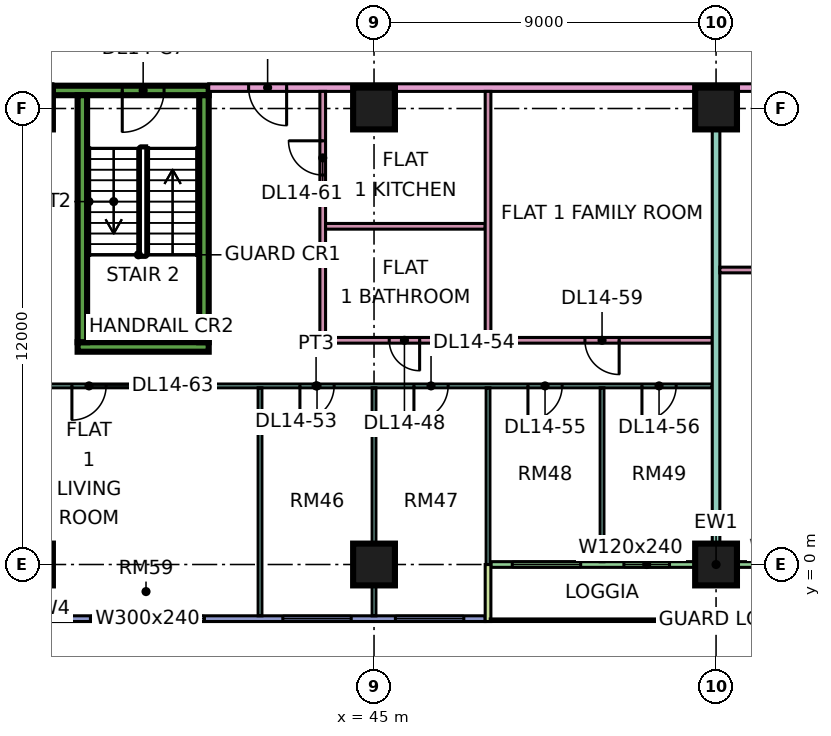
"""IFC4 building model, lengths in metres.
Left out: names, types, materials, properties, quantities, classifications, styles, units other than length and angle.
Written with IfcOpenShell. Run it as: python <this file> out.ifc"""

import sys

from ifc_helpers import new_model, si_unit, direction, frame, frame_2d, origin, origin_2d, place, context, subcontext, project, spatial, rectangle, extrude, element, fill, save


model = new_model("IFC4")
c1 = context("Model", 3, precision=1e-05, world=origin(), true_north=direction((0.0, 1.0)))
c2 = subcontext(c1, "Body", "Model", "MODEL_VIEW")
j1 = project(units=[si_unit("LENGTHUNIT", "METRE"), si_unit("PLANEANGLEUNIT", "RADIAN")], contexts=[c1])
p1 = place(None, origin())
s1 = spatial("IfcSite", under=j1, at=p1, CompositionType="ELEMENT")
p2 = place(p1, origin())
s2 = spatial("IfcBuilding", under=s1, at=p2, CompositionType="ELEMENT")
p3 = place(p2, frame((0.0, 0.0, 67.65)))
s3 = spatial("IfcBuildingStorey", under=s2, at=p3, CompositionType="ELEMENT", Elevation=67.65)
for number, where, z_axis, x_axis in (
    (1, (36.0, 0.0, 0.0), (0.0, 0.0, 1.0), (1.0, 0.0, 0.0)),
    (2, (36.0, 12.0, 0.0), (0.0, 0.0, 1.0), (1.0, 0.0, 0.0)),
    (3, (45.0, 0.0, 0.0), (0.0, 0.0, 1.0), (1.0, 0.0, 0.0)),
    (4, (45.0, 12.0, 0.0), (0.0, 0.0, 1.0), (1.0, 0.0, 0.0)),
    (5, (54.0, 0.0, 0.0), (0.0, 0.0, 1.0), (1.0, 0.0, 0.0)),
    (6, (54.0, 12.0, 0.0), (0.0, 0.0, 1.0), (1.0, 0.0, 0.0)),
):
    element("IfcColumn", number, at=place(p3, frame(where, z_axis=z_axis, x_axis=x_axis)), inside=s3, PredefinedType="COLUMN", context=c2, shape_type="SweptSolid", body=[
        extrude(rectangle(XDim=1.1, YDim=1.1, at=origin_2d()), origin(), (0.0, 0.0, 1.0), 3.75),
    ])
p4 = place(p3, frame((37.2, 5.725, 0.0), z_axis=(0.0, 0.0, 1.0), x_axis=(1.0, 0.0, 0.0)))
e7 = element("IfcWall", 7, at=p4, inside=s3, PredefinedType="SHEAR", context=c2, shape_type="SweptSolid", body=[
    extrude(rectangle(XDim=3.45, YDim=0.25, at=frame_2d((1.725, 0.0))), origin(), (0.0, 0.0, 1.0), 3.75),
])
p5 = place(p3, frame((36.55, 12.475, 0.0), z_axis=(0.0, 0.0, 1.0), x_axis=(1.0, 0.0, 0.0)))
e8 = element("IfcWall", 8, at=p5, inside=s3, PredefinedType="SHEAR", context=c2, shape_type="SweptSolid", body=[
    extrude(rectangle(XDim=4.1, YDim=0.25, at=frame_2d((2.05, 0.0))), origin(), (0.0, 0.0, 1.0), 3.75),
])
p6 = place(p5, frame((1.825, 0.0, 0.0)))
e9 = element("IfcOpeningElement", 9, at=p6, cuts=e8, PredefinedType="OPENING", context=c2, shape_type="SweptSolid", body=[
    extrude(rectangle(XDim=1.1, YDim=2.2, at=frame_2d((0.55, 1.1))), frame((0.0, 0.135, 0.0), z_axis=(0.0, -1.0, 0.0), x_axis=(1.0, 0.0, 0.0)), (0.0, 0.0, 1.0), 0.27),
])
for number, where, z_axis, x_axis in (
    (10, (37.325, 5.85, 0.0), (0.0, 0.0, 1.0), (0.0, 1.0, 0.0)),
    (11, (40.525, 5.85, 0.0), (0.0, 0.0, 1.0), (0.0, 1.0, 0.0)),
):
    element("IfcWall", number, at=place(p3, frame(where, z_axis=z_axis, x_axis=x_axis)), inside=s3, PredefinedType="SHEAR", context=c2, shape_type="SweptSolid", body=[
        extrude(rectangle(XDim=6.5, YDim=0.25, at=frame_2d((3.25, 0.0))), origin(), (0.0, 0.0, 1.0), 3.75),
    ])
p7 = place(p3, frame((36.075, -1.425, 0.0), z_axis=(0.0, 0.0, 1.0), x_axis=(1.0, 0.0, 0.0)))
e12 = element("IfcWall", 12, at=p7, inside=s3, PredefinedType="SOLIDWALL", context=c2, shape_type="SweptSolid", body=[
    extrude(rectangle(XDim=11.85, YDim=0.15, at=frame_2d((5.925, 0.0))), origin(), (0.0, 0.0, 1.0), 3.35),
])
p8 = place(p7, frame((1.462, 0.0, 0.45)))
e13 = element("IfcOpeningElement", 13, at=p8, cuts=e12, PredefinedType="OPENING", context=c2, shape_type="SweptSolid", body=[
    extrude(rectangle(XDim=3.0, YDim=2.4, at=frame_2d((1.5, 1.2))), frame((0.0, 0.085, 0.0), z_axis=(0.0, -1.0, 0.0), x_axis=(1.0, 0.0, 0.0)), (0.0, 0.0, 1.0), 0.17),
])
p9 = place(p7, frame((6.525, 0.0, 0.45)))
e14 = element("IfcOpeningElement", 14, at=p9, cuts=e12, PredefinedType="OPENING", context=c2, shape_type="SweptSolid", body=[
    extrude(rectangle(XDim=1.8, YDim=2.4, at=frame_2d((0.9, 1.2))), frame((0.0, 0.085, 0.0), z_axis=(0.0, -1.0, 0.0), x_axis=(1.0, 0.0, 0.0)), (0.0, 0.0, 1.0), 0.17),
])
p10 = place(p7, frame((9.488, 0.0, 0.45)))
e15 = element("IfcOpeningElement", 15, at=p10, cuts=e12, PredefinedType="OPENING", context=c2, shape_type="SweptSolid", body=[
    extrude(rectangle(XDim=1.8, YDim=2.4, at=frame_2d((0.9, 1.2))), frame((0.0, 0.085, 0.0), z_axis=(0.0, -1.0, 0.0), x_axis=(1.0, 0.0, 0.0)), (0.0, 0.0, 1.0), 0.17),
])
p11 = place(p3, frame((48.075, 0.0, 0.0), z_axis=(0.0, 0.0, 1.0), x_axis=(1.0, 0.0, 0.0)))
e16 = element("IfcWall", 16, at=p11, inside=s3, PredefinedType="SOLIDWALL", context=c2, shape_type="SweptSolid", body=[
    extrude(rectangle(XDim=11.85, YDim=0.15, at=frame_2d((5.925, 0.0))), origin(), (0.0, 0.0, 1.0), 3.35),
])
p12 = place(p11, frame((0.562, 0.0, 0.45)))
e17 = element("IfcOpeningElement", 17, at=p12, cuts=e16, PredefinedType="OPENING", context=c2, shape_type="SweptSolid", body=[
    extrude(rectangle(XDim=1.8, YDim=2.4, at=frame_2d((0.9, 1.2))), frame((0.0, 0.085, 0.0), z_axis=(0.0, -1.0, 0.0), x_axis=(1.0, 0.0, 0.0)), (0.0, 0.0, 1.0), 0.17),
])
p13 = place(p11, frame((3.5, 0.0, 0.45)))
e18 = element("IfcOpeningElement", 18, at=p13, cuts=e16, PredefinedType="OPENING", context=c2, shape_type="SweptSolid", body=[
    extrude(rectangle(XDim=1.2, YDim=2.4, at=frame_2d((0.6, 1.2))), frame((0.0, 0.085, 0.0), z_axis=(0.0, -1.0, 0.0), x_axis=(1.0, 0.0, 0.0)), (0.0, 0.0, 1.0), 0.17),
])
p14 = place(p11, frame((7.15, 0.0, 0.45)))
e19 = element("IfcOpeningElement", 19, at=p14, cuts=e16, PredefinedType="OPENING", context=c2, shape_type="SweptSolid", body=[
    extrude(rectangle(XDim=1.2, YDim=2.4, at=frame_2d((0.6, 1.2))), frame((0.0, 0.085, 0.0), z_axis=(0.0, -1.0, 0.0), x_axis=(1.0, 0.0, 0.0)), (0.0, 0.0, 1.0), 0.17),
])
p15 = place(p11, frame((9.488, 0.0, 0.45)))
e20 = element("IfcOpeningElement", 20, at=p15, cuts=e16, PredefinedType="OPENING", context=c2, shape_type="SweptSolid", body=[
    extrude(rectangle(XDim=1.8, YDim=2.4, at=frame_2d((0.9, 1.2))), frame((0.0, 0.085, 0.0), z_axis=(0.0, -1.0, 0.0), x_axis=(1.0, 0.0, 0.0)), (0.0, 0.0, 1.0), 0.17),
])
p16 = place(p3, frame((48.0, -1.5, 0.0), z_axis=(0.0, 0.0, 1.0), x_axis=(0.0, 1.0, 0.0)))
e21 = element("IfcWall", 21, at=p16, inside=s3, PredefinedType="SOLIDWALL", context=c2, shape_type="SweptSolid", body=[
    extrude(rectangle(XDim=1.5, YDim=0.15, at=frame_2d((0.75, 0.0))), origin(), (0.0, 0.0, 1.0), 3.35),
])
p17 = place(p3, frame((33.05, 4.7, 0.0), z_axis=(0.0, 0.0, 1.0), x_axis=(1.0, 0.0, 0.0)))
e22 = element("IfcWall", 22, at=p17, inside=s3, PredefinedType="PARTITIONING", context=c2, shape_type="SweptSolid", body=[
    extrude(rectangle(XDim=20.85, YDim=0.1, at=frame_2d((10.425, 0.0))), origin(), (0.0, 0.0, 1.0), 3.35),
])
p18 = place(p17, frame((10.0, 0.0, 0.0)))
e23 = element("IfcOpeningElement", 23, at=p18, cuts=e22, PredefinedType="OPENING", context=c2, shape_type="SweptSolid", body=[
    extrude(rectangle(XDim=0.9, YDim=2.1, at=frame_2d((0.45, 1.05))), frame((0.0, 0.06, 0.0), z_axis=(0.0, -1.0, 0.0), x_axis=(1.0, 0.0, 0.0)), (0.0, 0.0, 1.0), 0.12),
])
p19 = place(p17, frame((13.0, 0.0, 0.0)))
e24 = element("IfcOpeningElement", 24, at=p19, cuts=e22, PredefinedType="OPENING", context=c2, shape_type="SweptSolid", body=[
    extrude(rectangle(XDim=0.9, YDim=2.1, at=frame_2d((0.45, 1.05))), frame((0.0, 0.06, 0.0), z_axis=(0.0, -1.0, 0.0), x_axis=(1.0, 0.0, 0.0)), (0.0, 0.0, 1.0), 0.12),
])
p20 = place(p17, frame((16.0, 0.0, 0.0)))
e25 = element("IfcOpeningElement", 25, at=p20, cuts=e22, PredefinedType="OPENING", context=c2, shape_type="SweptSolid", body=[
    extrude(rectangle(XDim=0.9, YDim=2.1, at=frame_2d((0.45, 1.05))), frame((0.0, 0.06, 0.0), z_axis=(0.0, -1.0, 0.0), x_axis=(1.0, 0.0, 0.0)), (0.0, 0.0, 1.0), 0.12),
])
p21 = place(p17, frame((19.0, 0.0, 0.0)))
e26 = element("IfcOpeningElement", 26, at=p21, cuts=e22, PredefinedType="OPENING", context=c2, shape_type="SweptSolid", body=[
    extrude(rectangle(XDim=0.9, YDim=2.1, at=frame_2d((0.45, 1.05))), frame((0.0, 0.06, 0.0), z_axis=(0.0, -1.0, 0.0), x_axis=(1.0, 0.0, 0.0)), (0.0, 0.0, 1.0), 0.12),
])
p22 = place(p17, frame((4.0, 0.0, 0.0)))
e27 = element("IfcOpeningElement", 27, at=p22, cuts=e22, PredefinedType="OPENING", context=c2, shape_type="SweptSolid", body=[
    extrude(rectangle(XDim=0.9, YDim=2.1, at=frame_2d((0.45, 1.05))), frame((0.0, 0.06, 0.0), z_axis=(0.0, -1.0, 0.0), x_axis=(1.0, 0.0, 0.0)), (0.0, 0.0, 1.0), 0.12),
])
p23 = place(p3, frame((34.0, 12.55, 0.0), z_axis=(0.0, 0.0, 1.0), x_axis=(1.0, 0.0, 0.0)))
e28 = element("IfcWall", 28, at=p23, inside=s3, PredefinedType="PARTITIONING", context=c2, shape_type="SweptSolid", body=[
    extrude(rectangle(XDim=2.551, YDim=0.2, at=frame_2d((1.275, 0.0))), origin(), (0.0, 0.0, 1.0), 3.35),
])
p24 = place(p3, frame((40.65, 12.55, 0.0), z_axis=(0.0, 0.0, 1.0), x_axis=(1.0, 0.0, 0.0)))
e29 = element("IfcWall", 29, at=p24, inside=s3, PredefinedType="PARTITIONING", context=c2, shape_type="SweptSolid", body=[
    extrude(rectangle(XDim=31.35, YDim=0.2, at=frame_2d((15.675, 0.0))), origin(), (0.0, 0.0, 1.0), 3.35),
])
p25 = place(p24, frame((26.4, 0.0, 0.0)))
e30 = element("IfcOpeningElement", 30, at=p25, cuts=e29, PredefinedType="OPENING", context=c2, shape_type="SweptSolid", body=[
    extrude(rectangle(XDim=1.0, YDim=2.1, at=frame_2d((0.5, 1.05))), frame((0.0, 0.11, 0.0), z_axis=(0.0, -1.0, 0.0), x_axis=(1.0, 0.0, 0.0)), (0.0, 0.0, 1.0), 0.22),
])
p26 = place(p24, frame((1.05, 0.0, 0.0)))
e31 = element("IfcOpeningElement", 31, at=p26, cuts=e29, PredefinedType="OPENING", context=c2, shape_type="SweptSolid", body=[
    extrude(rectangle(XDim=1.0, YDim=2.1, at=frame_2d((0.5, 1.05))), frame((0.0, 0.11, 0.0), z_axis=(0.0, -1.0, 0.0), x_axis=(1.0, 0.0, 0.0)), (0.0, 0.0, 1.0), 0.22),
])
p27 = place(p3, frame((42.0, -1.35, 0.0), z_axis=(0.0, 0.0, 1.0), x_axis=(0.0, 1.0, 0.0)))
e32 = element("IfcWall", 32, at=p27, inside=s3, PredefinedType="PARTITIONING", context=c2, shape_type="SweptSolid", body=[
    extrude(rectangle(XDim=6.0, YDim=0.1, at=frame_2d((3.0, 0.0))), origin(), (0.0, 0.0, 1.0), 3.35),
])
p28 = place(p3, frame((43.575, 5.9, 0.0), z_axis=(0.0, 0.0, 1.0), x_axis=(1.0, 0.0, 0.0)))
e33 = element("IfcWall", 33, at=p28, inside=s3, PredefinedType="PARTITIONING", context=c2, shape_type="SweptSolid", body=[
    extrude(rectangle(XDim=10.325, YDim=0.15, at=frame_2d((5.163, 0.0))), origin(), (0.0, 0.0, 1.0), 3.35),
])
p29 = place(p28, frame((1.825, 0.0, 0.0)))
e34 = element("IfcOpeningElement", 34, at=p29, cuts=e33, PredefinedType="OPENING", context=c2, shape_type="SweptSolid", body=[
    extrude(rectangle(XDim=0.8, YDim=2.1, at=frame_2d((0.4, 1.05))), frame((0.0, 0.085, 0.0), z_axis=(0.0, -1.0, 0.0), x_axis=(1.0, 0.0, 0.0)), (0.0, 0.0, 1.0), 0.17),
])
p30 = place(p28, frame((6.975, 0.0, 0.0)))
e35 = element("IfcOpeningElement", 35, at=p30, cuts=e33, PredefinedType="OPENING", context=c2, shape_type="SweptSolid", body=[
    extrude(rectangle(XDim=0.9, YDim=2.1, at=frame_2d((0.45, 1.05))), frame((0.0, 0.085, 0.0), z_axis=(0.0, -1.0, 0.0), x_axis=(1.0, 0.0, 0.0)), (0.0, 0.0, 1.0), 0.17),
])
p31 = place(p3, frame((43.65, 5.975, 0.0), z_axis=(0.0, 0.0, 1.0), x_axis=(0.0, 1.0, 0.0)))
e36 = element("IfcWall", 36, at=p31, inside=s3, PredefinedType="PARTITIONING", context=c2, shape_type="SweptSolid", body=[
    extrude(rectangle(XDim=6.475, YDim=0.15, at=frame_2d((3.237, 0.0))), origin(), (0.0, 0.0, 1.0), 3.35),
])
p32 = place(p31, frame((4.275, 0.0, 0.0)))
e37 = element("IfcOpeningElement", 37, at=p32, cuts=e36, PredefinedType="OPENING", context=c2, shape_type="SweptSolid", body=[
    extrude(rectangle(XDim=0.9, YDim=2.1, at=frame_2d((0.45, 1.05))), frame((0.0, 0.085, 0.0), z_axis=(0.0, -1.0, 0.0), x_axis=(1.0, 0.0, 0.0)), (0.0, 0.0, 1.0), 0.17),
])
p33 = place(p3, frame((43.725, 8.9, 0.0), z_axis=(0.0, 0.0, 1.0), x_axis=(1.0, 0.0, 0.0)))
e38 = element("IfcWall", 38, at=p33, inside=s3, PredefinedType="PARTITIONING", context=c2, shape_type="SweptSolid", body=[
    extrude(rectangle(XDim=4.2, YDim=0.15, at=frame_2d((2.1, 0.0))), origin(), (0.0, 0.0, 1.0), 3.35),
])
p34 = place(p3, frame((45.0, -1.351, 0.0), z_axis=(0.0, 0.0, 1.0), x_axis=(0.0, 1.0, 0.0)))
e39 = element("IfcWall", 39, at=p34, inside=s3, PredefinedType="PARTITIONING", context=c2, shape_type="SweptSolid", body=[
    extrude(rectangle(XDim=6.001, YDim=0.1, at=frame_2d((3.0, 0.0))), origin(), (0.0, 0.0, 1.0), 3.35),
])
p35 = place(p3, frame((48.0, 0.0, 0.0), z_axis=(0.0, 0.0, 1.0), x_axis=(0.0, 1.0, 0.0)))
e40 = element("IfcWall", 40, at=p35, inside=s3, PredefinedType="PARTITIONING", context=c2, shape_type="SweptSolid", body=[
    extrude(rectangle(XDim=4.65, YDim=0.1, at=frame_2d((2.325, 0.0))), origin(), (0.0, 0.0, 1.0), 3.35),
])
p36 = place(p3, frame((48.0, 5.975, 0.0), z_axis=(0.0, 0.0, 1.0), x_axis=(0.0, 1.0, 0.0)))
e41 = element("IfcWall", 41, at=p36, inside=s3, PredefinedType="PARTITIONING", context=c2, shape_type="SweptSolid", body=[
    extrude(rectangle(XDim=6.475, YDim=0.15, at=frame_2d((3.237, 0.0))), origin(), (0.0, 0.0, 1.0), 3.35),
])
p37 = place(p3, frame((51.0, 0.074, 0.0), z_axis=(0.0, 0.0, 1.0), x_axis=(0.0, 1.0, 0.0)))
e42 = element("IfcWall", 42, at=p37, inside=s3, PredefinedType="PARTITIONING", context=c2, shape_type="SweptSolid", body=[
    extrude(rectangle(XDim=4.576, YDim=0.1, at=frame_2d((2.288, 0.0))), origin(), (0.0, 0.0, 1.0), 3.35),
])
p38 = place(p3, frame((54.0, 0.074, 0.0), z_axis=(0.0, 0.0, 1.0), x_axis=(0.0, 1.0, 0.0)))
e43 = element("IfcWall", 43, at=p38, inside=s3, PredefinedType="PARTITIONING", context=c2, shape_type="SweptSolid", body=[
    extrude(rectangle(XDim=12.376, YDim=0.2, at=frame_2d((6.188, 0.0))), origin(), (0.0, 0.0, 1.0), 3.35),
])
p39 = place(p3, frame((54.1, 7.75, 0.0), z_axis=(0.0, 0.0, 1.0), x_axis=(1.0, 0.0, 0.0)))
e44 = element("IfcWall", 44, at=p39, inside=s3, PredefinedType="PARTITIONING", context=c2, shape_type="SweptSolid", body=[
    extrude(rectangle(XDim=12.575, YDim=0.15, at=frame_2d((6.288, 0.0))), origin(), (0.0, 0.0, 1.0), 3.35),
])
p40 = place(p39, frame((10.2, 0.0, 0.0)))
e45 = element("IfcOpeningElement", 45, at=p40, cuts=e44, PredefinedType="OPENING", context=c2, shape_type="SweptSolid", body=[
    extrude(rectangle(XDim=0.8, YDim=2.1, at=frame_2d((0.4, 1.05))), frame((0.0, 0.085, 0.0), z_axis=(0.0, -1.0, 0.0), x_axis=(1.0, 0.0, 0.0)), (0.0, 0.0, 1.0), 0.17),
])
p41 = place(p39, frame((2.6, 0.0, 0.0)))
e46 = element("IfcOpeningElement", 46, at=p41, cuts=e44, PredefinedType="OPENING", context=c2, shape_type="SweptSolid", body=[
    extrude(rectangle(XDim=0.9, YDim=2.1, at=frame_2d((0.45, 1.05))), frame((0.0, 0.085, 0.0), z_axis=(0.0, -1.0, 0.0), x_axis=(1.0, 0.0, 0.0)), (0.0, 0.0, 1.0), 0.17),
])
p42 = place(p39, frame((7.05, 0.0, 0.0)))
e47 = element("IfcOpeningElement", 47, at=p42, cuts=e44, PredefinedType="OPENING", context=c2, shape_type="SweptSolid", body=[
    extrude(rectangle(XDim=0.8, YDim=2.1, at=frame_2d((0.4, 1.05))), frame((0.0, 0.085, 0.0), z_axis=(0.0, -1.0, 0.0), x_axis=(1.0, 0.0, 0.0)), (0.0, 0.0, 1.0), 0.17),
])
p43 = place(p8, origin())
e48 = element("IfcWindow", 48, at=p43, inside=s3, PartitioningType="SINGLE_PANEL", PredefinedType="WINDOW", context=c2, shape_type="SweptSolid", body=[
    extrude(rectangle(XDim=3.0, YDim=2.4, at=frame_2d((1.5, 1.2))), frame((0.0, 0.03, 0.0), z_axis=(0.0, -1.0, 0.0), x_axis=(1.0, 0.0, 0.0)), (0.0, 0.0, 1.0), 0.06),
])
fill(e13, e48)
p44 = place(p9, origin())
e49 = element("IfcWindow", 49, at=p44, inside=s3, PartitioningType="SINGLE_PANEL", PredefinedType="WINDOW", context=c2, shape_type="SweptSolid", body=[
    extrude(rectangle(XDim=1.8, YDim=2.4, at=frame_2d((0.9, 1.2))), frame((0.0, 0.03, 0.0), z_axis=(0.0, -1.0, 0.0), x_axis=(1.0, 0.0, 0.0)), (0.0, 0.0, 1.0), 0.06),
])
fill(e14, e49)
p45 = place(p10, origin())
e50 = element("IfcWindow", 50, at=p45, inside=s3, PartitioningType="SINGLE_PANEL", PredefinedType="WINDOW", context=c2, shape_type="SweptSolid", body=[
    extrude(rectangle(XDim=1.8, YDim=2.4, at=frame_2d((0.9, 1.2))), frame((0.0, 0.03, 0.0), z_axis=(0.0, -1.0, 0.0), x_axis=(1.0, 0.0, 0.0)), (0.0, 0.0, 1.0), 0.06),
])
fill(e15, e50)
p46 = place(p12, origin())
e51 = element("IfcWindow", 51, at=p46, inside=s3, PartitioningType="SINGLE_PANEL", PredefinedType="WINDOW", context=c2, shape_type="SweptSolid", body=[
    extrude(rectangle(XDim=1.8, YDim=2.4, at=frame_2d((0.9, 1.2))), frame((0.0, 0.03, 0.0), z_axis=(0.0, -1.0, 0.0), x_axis=(1.0, 0.0, 0.0)), (0.0, 0.0, 1.0), 0.06),
])
fill(e17, e51)
p47 = place(p13, origin())
e52 = element("IfcWindow", 52, at=p47, inside=s3, PartitioningType="SINGLE_PANEL", PredefinedType="WINDOW", context=c2, shape_type="SweptSolid", body=[
    extrude(rectangle(XDim=1.2, YDim=2.4, at=frame_2d((0.6, 1.2))), frame((0.0, 0.03, 0.0), z_axis=(0.0, -1.0, 0.0), x_axis=(1.0, 0.0, 0.0)), (0.0, 0.0, 1.0), 0.06),
])
fill(e18, e52)
p48 = place(p6, frame((1.1, 0.0, 0.0), z_axis=(0.0, 0.0, 1.0), x_axis=(-1.0, 0.0, 0.0)))
e53 = element("IfcDoor", 53, at=p48, inside=s3, OperationType="SINGLE_SWING_LEFT", PredefinedType="DOOR", context=c2, shape_type="SweptSolid", body=[
    extrude(rectangle(XDim=1.1, YDim=2.2, at=frame_2d((0.55, 1.1))), frame((0.0, 0.025, 0.0), z_axis=(0.0, -1.0, 0.0), x_axis=(1.0, 0.0, 0.0)), (0.0, 0.0, 1.0), 0.05),
])
fill(e9, e53)
p49 = place(p29, origin())
e54 = element("IfcDoor", 54, at=p49, inside=s3, OperationType="SINGLE_SWING_RIGHT", PredefinedType="DOOR", context=c2, shape_type="SweptSolid", body=[
    extrude(rectangle(XDim=0.8, YDim=2.1, at=frame_2d((0.4, 1.05))), frame((0.0, 0.025, 0.0), z_axis=(0.0, -1.0, 0.0), x_axis=(1.0, 0.0, 0.0)), (0.0, 0.0, 1.0), 0.05),
])
fill(e34, e54)
p50 = place(p18, frame((0.9, 0.0, 0.0), z_axis=(0.0, 0.0, 1.0), x_axis=(-1.0, 0.0, 0.0)))
e55 = element("IfcDoor", 55, at=p50, inside=s3, OperationType="SINGLE_SWING_LEFT", PredefinedType="DOOR", context=c2, shape_type="SweptSolid", body=[
    extrude(rectangle(XDim=0.9, YDim=2.1, at=frame_2d((0.45, 1.05))), frame((0.0, 0.025, 0.0), z_axis=(0.0, -1.0, 0.0), x_axis=(1.0, 0.0, 0.0)), (0.0, 0.0, 1.0), 0.05),
])
fill(e23, e55)
p51 = place(p19, frame((0.9, 0.0, 0.0), z_axis=(0.0, 0.0, 1.0), x_axis=(-1.0, 0.0, 0.0)))
e56 = element("IfcDoor", 56, at=p51, inside=s3, OperationType="SINGLE_SWING_LEFT", PredefinedType="DOOR", context=c2, shape_type="SweptSolid", body=[
    extrude(rectangle(XDim=0.9, YDim=2.1, at=frame_2d((0.45, 1.05))), frame((0.0, 0.025, 0.0), z_axis=(0.0, -1.0, 0.0), x_axis=(1.0, 0.0, 0.0)), (0.0, 0.0, 1.0), 0.05),
])
fill(e24, e56)
p52 = place(p20, frame((0.9, 0.0, 0.0), z_axis=(0.0, 0.0, 1.0), x_axis=(-1.0, 0.0, 0.0)))
e57 = element("IfcDoor", 57, at=p52, inside=s3, OperationType="SINGLE_SWING_LEFT", PredefinedType="DOOR", context=c2, shape_type="SweptSolid", body=[
    extrude(rectangle(XDim=0.9, YDim=2.1, at=frame_2d((0.45, 1.05))), frame((0.0, 0.025, 0.0), z_axis=(0.0, -1.0, 0.0), x_axis=(1.0, 0.0, 0.0)), (0.0, 0.0, 1.0), 0.05),
])
fill(e25, e57)
p53 = place(p21, frame((0.9, 0.0, 0.0), z_axis=(0.0, 0.0, 1.0), x_axis=(-1.0, 0.0, 0.0)))
e58 = element("IfcDoor", 58, at=p53, inside=s3, OperationType="SINGLE_SWING_LEFT", PredefinedType="DOOR", context=c2, shape_type="SweptSolid", body=[
    extrude(rectangle(XDim=0.9, YDim=2.1, at=frame_2d((0.45, 1.05))), frame((0.0, 0.025, 0.0), z_axis=(0.0, -1.0, 0.0), x_axis=(1.0, 0.0, 0.0)), (0.0, 0.0, 1.0), 0.05),
])
fill(e26, e58)
p54 = place(p30, origin())
e59 = element("IfcDoor", 59, at=p54, inside=s3, OperationType="SINGLE_SWING_RIGHT", PredefinedType="DOOR", context=c2, shape_type="SweptSolid", body=[
    extrude(rectangle(XDim=0.9, YDim=2.1, at=frame_2d((0.45, 1.05))), frame((0.0, 0.025, 0.0), z_axis=(0.0, -1.0, 0.0), x_axis=(1.0, 0.0, 0.0)), (0.0, 0.0, 1.0), 0.05),
])
fill(e35, e59)
p55 = place(p26, origin())
e60 = element("IfcDoor", 60, at=p55, inside=s3, OperationType="SINGLE_SWING_RIGHT", PredefinedType="DOOR", context=c2, shape_type="SweptSolid", body=[
    extrude(rectangle(XDim=1.0, YDim=2.1, at=frame_2d((0.5, 1.05))), frame((0.0, 0.025, 0.0), z_axis=(0.0, -1.0, 0.0), x_axis=(1.0, 0.0, 0.0)), (0.0, 0.0, 1.0), 0.05),
])
fill(e31, e60)
p56 = place(p32, frame((0.9, 0.0, 0.0), z_axis=(0.0, 0.0, 1.0), x_axis=(-1.0, 0.0, 0.0)))
e61 = element("IfcDoor", 61, at=p56, inside=s3, OperationType="SINGLE_SWING_RIGHT", PredefinedType="DOOR", context=c2, shape_type="SweptSolid", body=[
    extrude(rectangle(XDim=0.9, YDim=2.1, at=frame_2d((0.45, 1.05))), frame((0.0, 0.025, 0.0), z_axis=(0.0, -1.0, 0.0), x_axis=(1.0, 0.0, 0.0)), (0.0, 0.0, 1.0), 0.05),
])
fill(e37, e61)
p57 = place(p22, frame((0.9, 0.0, 0.0), z_axis=(0.0, 0.0, 1.0), x_axis=(-1.0, 0.0, 0.0)))
e62 = element("IfcDoor", 62, at=p57, inside=s3, OperationType="SINGLE_SWING_LEFT", PredefinedType="DOOR", context=c2, shape_type="SweptSolid", body=[
    extrude(rectangle(XDim=0.9, YDim=2.1, at=frame_2d((0.45, 1.05))), frame((0.0, 0.025, 0.0), z_axis=(0.0, -1.0, 0.0), x_axis=(1.0, 0.0, 0.0)), (0.0, 0.0, 1.0), 0.05),
])
fill(e27, e62)
save(model, sys.argv[1])
